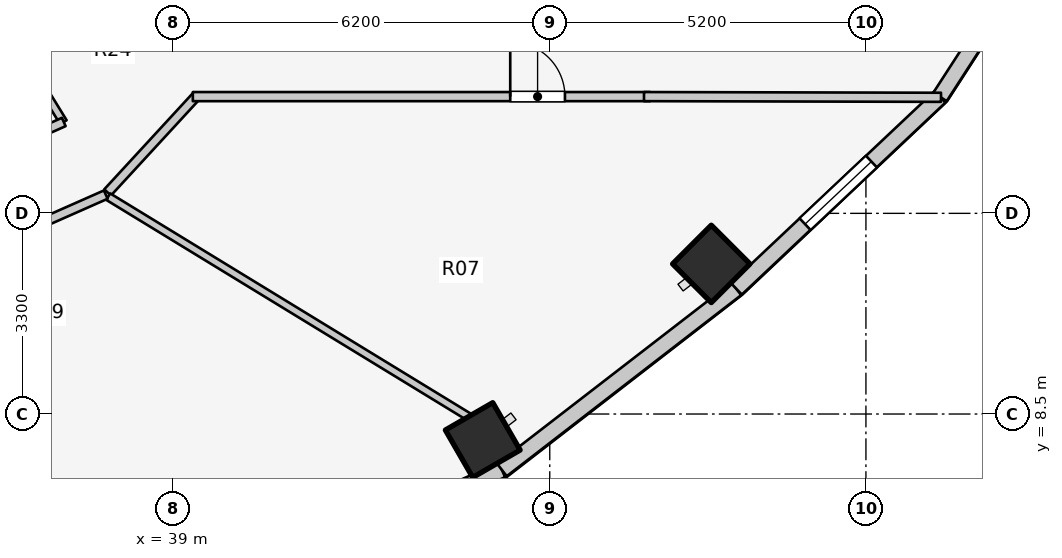
"""IFC4 building model, lengths in metres.
Left out: names, types, materials, properties, quantities, classifications, styles, units other than length and angle.
Written with IfcOpenShell. Run it as: python <this file> out.ifc"""

import sys

from ifc_helpers import new_model, si_unit, direction, frame, frame_2d, origin, origin_2d, place, context, subcontext, project, spatial, rectangle, extrude, element, fill, save


model = new_model("IFC4")
c1 = context("Model", 3, precision=1e-05, world=origin(), true_north=direction((0.0, 1.0)))
c2 = subcontext(c1, "Body", "Model", "MODEL_VIEW")
j1 = project(units=[si_unit("LENGTHUNIT", "METRE"), si_unit("PLANEANGLEUNIT", "RADIAN")], contexts=[c1])
p1 = place(None, origin())
s1 = spatial("IfcSite", under=j1, at=p1, CompositionType="ELEMENT")
p2 = place(p1, origin())
s2 = spatial("IfcBuilding", under=s1, at=p2, CompositionType="ELEMENT")
p3 = place(p2, frame((0.0, 0.0, 180.8)))
s3 = spatial("IfcBuildingStorey", under=s2, at=p3, CompositionType="ELEMENT", Elevation=180.8)
for number, where, z_axis, x_axis in (
    (1, (44.098, 8.072, 0.0), (0.0, 0.0, 1.0), (0.5, -0.866, 0.0)),
    (2, (47.857, 10.969, 0.0), (0.0, 0.0, 1.0), (0.707, -0.707, 0.0)),
):
    element("IfcColumn", number, at=place(p3, frame(where, z_axis=z_axis, x_axis=x_axis)), inside=s3, PredefinedType="COLUMN", context=c2, shape_type="SweptSolid", body=[
        extrude(rectangle(XDim=0.9, YDim=0.9, at=origin_2d()), origin(), (0.0, 0.0, 1.0), 3.1),
    ])
p4 = place(p3, frame((39.365, 5.315, 0.0), z_axis=(0.0, 0.0, 1.0), x_axis=(0.912353637112, 0.409403029847, 0.0)))
e3 = element("IfcWall", 3, at=p4, inside=s3, PredefinedType="STANDARD", context=c2, shape_type="SweptSolid", body=[
    extrude(rectangle(XDim=5.533, YDim=0.26, at=frame_2d((2.766, 0.0))), origin(), (0.0, 0.0, 1.0), 2.85),
])
p5 = place(p4, frame((2.016, 0.0, 0.75)))
e4 = element("IfcOpeningElement", 4, at=p5, cuts=e3, PredefinedType="OPENING", context=c2, shape_type="SweptSolid", body=[
    extrude(rectangle(XDim=1.5, YDim=1.6, at=frame_2d((0.75, 0.8))), frame((0.0, 0.14, 0.0), z_axis=(0.0, -1.0, 0.0), x_axis=(1.0, 0.0, 0.0)), (0.0, 0.0, 1.0), 0.28),
])
p6 = place(p3, frame((44.413, 7.581, 0.0), z_axis=(0.0, 0.0, 1.0), x_axis=(0.791460185804, 0.611220724687, 0.0)))
e5 = element("IfcWall", 5, at=p6, inside=s3, PredefinedType="STANDARD", context=c2, shape_type="SweptSolid", body=[
    extrude(rectangle(XDim=4.872, YDim=0.26, at=frame_2d((2.436, 0.0))), origin(), (0.0, 0.0, 1.0), 2.85),
])
p7 = place(p3, frame((48.269, 10.559, 0.0), z_axis=(0.0, 0.0, 1.0), x_axis=(0.727667301037, 0.68593024354, 0.0)))
e6 = element("IfcWall", 6, at=p7, inside=s3, PredefinedType="STANDARD", context=c2, shape_type="SweptSolid", body=[
    extrude(rectangle(XDim=4.604, YDim=0.26, at=frame_2d((2.302, 0.0))), origin(), (0.0, 0.0, 1.0), 2.85),
])
p8 = place(p7, frame((1.552, 0.0, 0.75)))
e7 = element("IfcOpeningElement", 7, at=p8, cuts=e6, PredefinedType="OPENING", context=c2, shape_type="SweptSolid", body=[
    extrude(rectangle(XDim=1.5, YDim=1.6, at=frame_2d((0.75, 0.8))), frame((0.0, 0.14, 0.0), z_axis=(0.0, -1.0, 0.0), x_axis=(1.0, 0.0, 0.0)), (0.0, 0.0, 1.0), 0.28),
])
p9 = place(p3, frame((51.619, 13.716, 0.0), z_axis=(0.0, 0.0, 1.0), x_axis=(0.543358984534, 0.839500454989, 0.0)))
e8 = element("IfcWall", 8, at=p9, inside=s3, PredefinedType="STANDARD", context=c2, shape_type="SweptSolid", body=[
    extrude(rectangle(XDim=4.511, YDim=0.26, at=frame_2d((2.256, 0.0))), origin(), (0.0, 0.0, 1.0), 2.85),
])
p10 = place(p9, frame((1.506, 0.0, 0.75)))
e9 = element("IfcOpeningElement", 9, at=p10, cuts=e8, PredefinedType="OPENING", context=c2, shape_type="SweptSolid", body=[
    extrude(rectangle(XDim=1.5, YDim=1.6, at=frame_2d((0.75, 0.8))), frame((0.0, 0.14, 0.0), z_axis=(0.0, -1.0, 0.0), x_axis=(1.0, 0.0, 0.0)), (0.0, 0.0, 1.0), 0.28),
])
p11 = place(p3, frame((37.928, 12.144, 0.0), z_axis=(0.0, 0.0, 1.0), x_axis=(0.677579737957, 0.735449317567, 0.0)))
e10 = element("IfcWall", 10, at=p11, inside=s3, PredefinedType="PARTITIONING", context=c2, shape_type="SweptSolid", body=[
    extrude(rectangle(XDim=2.173, YDim=0.15, at=frame_2d((1.086, 0.0))), origin(), (0.0, 0.0, 1.0), 2.299),
])
p12 = place(p3, frame((39.33, 13.72, 0.0), z_axis=(0.0, 0.0, 1.0), x_axis=(1.0, 0.0, 0.0)))
e11 = element("IfcWall", 11, at=p12, inside=s3, PredefinedType="PARTITIONING", context=c2, shape_type="SweptSolid", body=[
    extrude(rectangle(XDim=7.52, YDim=0.15, at=frame_2d((3.76, 0.0))), origin(), (0.0, 0.0, 1.0), 2.299),
])
p13 = place(p12, frame((5.22, 0.0, 0.0)))
e12 = element("IfcOpeningElement", 12, at=p13, cuts=e11, PredefinedType="OPENING", context=c2, shape_type="SweptSolid", body=[
    extrude(rectangle(XDim=0.9, YDim=2.1, at=frame_2d((0.45, 1.05))), frame((0.0, 0.085, 0.0), z_axis=(0.0, -1.0, 0.0), x_axis=(1.0, 0.0, 0.0)), (0.0, 0.0, 1.0), 0.17),
])
p14 = place(p3, frame((46.75, 13.72, 0.0), z_axis=(0.0, 0.0, 1.0), x_axis=(0.999997122315, -0.00239903348, 0.0)))
e13 = element("IfcWall", 13, at=p14, inside=s3, PredefinedType="PARTITIONING", context=c2, shape_type="SweptSolid", body=[
    extrude(rectangle(XDim=4.885, YDim=0.15, at=frame_2d((2.442, 0.0))), origin(), (0.0, 0.0, 1.0), 2.22),
])
p15 = place(p3, frame((35.55, 15.985, 0.0), z_axis=(0.0, 0.0, 1.0), x_axis=(0.523587550846, -0.851971875474, 0.0)))
e14 = element("IfcWall", 14, at=p15, inside=s3, PredefinedType="PARTITIONING", context=c2, shape_type="SweptSolid", body=[
    extrude(rectangle(XDim=3.153, YDim=0.125, at=frame_2d((1.577, 0.0))), origin(), (0.0, 0.0, 1.0), 2.299),
])
p16 = place(p3, frame((34.69, 12.179, 0.0), z_axis=(0.0, 0.0, 1.0), x_axis=(0.913145536541, 0.407633694749, 0.0)))
e15 = element("IfcWall", 15, at=p16, inside=s3, PredefinedType="PARTITIONING", context=c2, shape_type="SweptSolid", body=[
    extrude(rectangle(XDim=2.756, YDim=0.15, at=frame_2d((1.378, 0.0))), origin(), (0.0, 0.0, 1.0), 2.299),
])
p17 = place(p16, frame((0.903, 0.0, 0.0)))
e16 = element("IfcOpeningElement", 16, at=p17, cuts=e15, PredefinedType="OPENING", context=c2, shape_type="SweptSolid", body=[
    extrude(rectangle(XDim=0.95, YDim=2.1, at=frame_2d((0.475, 1.05))), frame((0.0, 0.085, 0.0), z_axis=(0.0, -1.0, 0.0), x_axis=(1.0, 0.0, 0.0)), (0.0, 0.0, 1.0), 0.17),
])
p18 = place(p3, frame((37.938, 12.075, 0.0), z_axis=(0.0, 0.0, 1.0), x_axis=(0.853440334679, -0.521190555501, 0.0)))
e17 = element("IfcWall", 17, at=p18, inside=s3, PredefinedType="PARTITIONING", context=c2, shape_type="SweptSolid", body=[
    extrude(rectangle(XDim=6.966, YDim=0.125, at=frame_2d((3.483, 0.0))), origin(), (0.0, 0.0, 1.0), 2.299),
])
p19 = place(p3, frame((35.042, 10.844, 0.0), z_axis=(0.0, 0.0, 1.0), x_axis=(0.914519212393, 0.40454247016, 0.0)))
e18 = element("IfcWall", 18, at=p19, inside=s3, PredefinedType="PARTITIONING", context=c2, shape_type="SweptSolid", body=[
    extrude(rectangle(XDim=3.124, YDim=0.15, at=frame_2d((1.562, 0.0))), origin(), (0.0, 0.0, 1.0), 2.299),
])
p20 = place(p19, frame((1.062, 0.0, 0.0)))
e19 = element("IfcOpeningElement", 19, at=p20, cuts=e18, PredefinedType="OPENING", context=c2, shape_type="SweptSolid", body=[
    extrude(rectangle(XDim=1.0, YDim=2.1, at=frame_2d((0.5, 1.05))), frame((0.0, 0.085, 0.0), z_axis=(0.0, -1.0, 0.0), x_axis=(1.0, 0.0, 0.0)), (0.0, 0.0, 1.0), 0.17),
])
p21 = place(p8, origin())
e20 = element("IfcWindow", 20, at=p21, inside=s3, PartitioningType="SINGLE_PANEL", PredefinedType="WINDOW", context=c2, shape_type="SweptSolid", body=[
    extrude(rectangle(XDim=1.5, YDim=1.6, at=frame_2d((0.75, 0.8))), frame((0.0, 0.03, 0.0), z_axis=(0.0, -1.0, 0.0), x_axis=(1.0, 0.0, 0.0)), (0.0, 0.0, 1.0), 0.06),
])
fill(e7, e20)
p22 = place(p13, origin())
e21 = element("IfcDoor", 21, at=p22, inside=s3, OperationType="SINGLE_SWING_LEFT", PredefinedType="DOOR", context=c2, shape_type="SweptSolid", body=[
    extrude(rectangle(XDim=0.9, YDim=2.1, at=frame_2d((0.45, 1.05))), frame((0.0, 0.025, 0.0), z_axis=(0.0, -1.0, 0.0), x_axis=(1.0, 0.0, 0.0)), (0.0, 0.0, 1.0), 0.05),
])
fill(e12, e21)
save(model, sys.argv[1])
